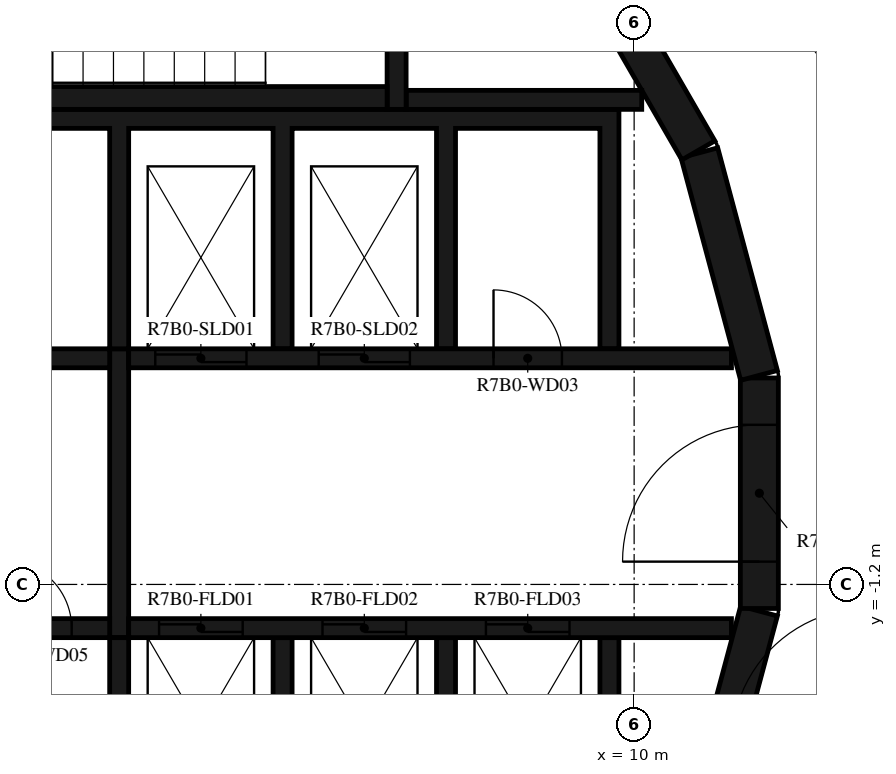
"""IFC4 building model, lengths in metres.
Left out: names, types, materials, properties, quantities, classifications, styles, units other than length and angle.
Written with IfcOpenShell. Run it as: python <this file> out.ifc"""

import sys

from ifc_helpers import new_model, si_unit, direction, frame, frame_2d, origin, place, context, subcontext, project, spatial, polyline, rectangle, outline, extrude, element, fill, save


model = new_model("IFC4")
c1 = context("Model", 3, precision=1e-05, world=origin(), true_north=direction((0.0, 1.0)))
c2 = subcontext(c1, "Body", "Model", "MODEL_VIEW")
j1 = project(units=[si_unit("LENGTHUNIT", "METRE"), si_unit("PLANEANGLEUNIT", "RADIAN")], contexts=[c1])
p1 = place(None, origin())
s1 = spatial("IfcSite", under=j1, at=p1, CompositionType="ELEMENT")
p2 = place(p1, origin())
s2 = spatial("IfcBuilding", under=s1, at=p2, CompositionType="ELEMENT")
p3 = place(p2, frame((0.0, 0.0, 277.4)))
s3 = spatial("IfcBuildingStorey", under=s2, at=p3, CompositionType="ELEMENT", Elevation=277.4)
p4 = place(p3, frame((10.858, -4.479, 0.0), z_axis=(0.0, 0.0, 1.0), x_axis=(0.258734743916, 0.965948410781, 0.0)))
e1 = element("IfcWall", 1, at=p4, inside=s3, PredefinedType="SHEAR", context=c2, shape_type="SweptSolid", body=[
    extrude(rectangle(XDim=3.033, YDim=0.5, at=frame_2d((1.516, 0.0))), origin(), (0.0, 0.0, 1.0), 3.12),
])
p5 = place(p3, frame((11.647, -1.516, 0.0), z_axis=(0.0, 0.0, 1.0), x_axis=(0.0, 1.0, 0.0)))
e2 = element("IfcWall", 2, at=p5, inside=s3, PredefinedType="SHEAR", context=c2, shape_type="SweptSolid", body=[
    extrude(rectangle(XDim=3.033, YDim=0.5, at=frame_2d((1.516, 0.0))), origin(), (0.0, 0.0, 1.0), 3.12),
])
p6 = place(p5, frame((0.616, 0.0, 0.0)))
e3 = element("IfcOpeningElement", 3, at=p6, cuts=e2, PredefinedType="OPENING", context=c2, shape_type="SweptSolid", body=[
    extrude(rectangle(XDim=1.8, YDim=2.1, at=frame_2d((0.9, 1.05))), frame((0.0, 0.26, 0.0), z_axis=(0.0, -1.0, 0.0), x_axis=(1.0, 0.0, 0.0)), (0.0, 0.0, 1.0), 0.52),
])
for number, where, z_axis, x_axis in (
    (4, (11.643, 1.55, 0.0), (0.0, 0.0, 1.0), (-0.259, 0.966, 0.0)),
    (5, (10.845, 4.51, 0.0), (0.0, 0.0, 1.0), (-0.5, 0.866, 0.0)),
):
    element("IfcWall", number, at=place(p3, frame(where, z_axis=z_axis, x_axis=x_axis)), inside=s3, PredefinedType="SHEAR", context=c2, shape_type="SweptSolid", body=[
        extrude(rectangle(XDim=3.033, YDim=0.5, at=frame_2d((1.516, 0.0))), origin(), (0.0, 0.0, 1.0), 3.12),
    ])
p7 = place(p3, frame((0.0, 5.2, 0.0), z_axis=(0.0, 0.0, 1.0), x_axis=(1.0, 0.0, 0.0)))
e6 = element("IfcWall", 6, at=p7, inside=s3, PredefinedType="SHEAR", context=c2, shape_type="SweptSolid", body=[
    extrude(rectangle(XDim=6.75, YDim=0.3, at=frame_2d((3.375, 0.0))), origin(), (0.0, 0.0, 1.0), 3.12),
])
p8 = place(p3, frame((6.875, 5.05, 0.0), z_axis=(0.0, 0.0, 1.0), x_axis=(0.0, 1.0, 0.0)))
e7 = element("IfcWall", 7, at=p8, inside=s3, PredefinedType="SHEAR", context=c2, shape_type="SweptSolid", body=[
    extrude(rectangle(XDim=3.92, YDim=0.25, at=frame_2d((1.96, 0.0))), origin(), (0.0, 0.0, 1.0), 3.12),
])
p9 = place(p8, frame((1.11, 0.0, 0.0)))
e8 = element("IfcOpeningElement", 8, at=p9, cuts=e7, PredefinedType="OPENING", context=c2, shape_type="SweptSolid", body=[
    extrude(rectangle(XDim=1.2, YDim=2.1, at=frame_2d((0.6, 1.05))), frame((0.0, 0.135, 0.0), z_axis=(0.0, -1.0, 0.0), x_axis=(1.0, 0.0, 0.0)), (0.0, 0.0, 1.0), 0.27),
])
p10 = place(p3, frame((7.0, 5.175, 0.0), z_axis=(0.0, 0.0, 1.0), x_axis=(1.0, 0.0, 0.0)))
e9 = element("IfcWall", 9, at=p10, inside=s3, PredefinedType="SHEAR", context=c2, shape_type="SweptSolid", body=[
    extrude(rectangle(XDim=3.1, YDim=0.25, at=frame_2d((1.55, 0.0))), origin(), (0.0, 0.0, 1.0), 3.12),
])
p11 = place(p3, origin())
e10 = element("IfcWall", 10, at=p11, inside=s3, PredefinedType="SHEAR", context=c2, shape_type="SweptSolid", body=[
    extrude(outline(polyline([(-9.8, 1.9), (-9.55, 1.9), (-9.55, 4.8), (-5.5, 4.8), (-5.5, 1.9), (-5.25, 1.9), (-5.25, 4.8), (3.1, 4.8), (3.1, 1.9), (3.35, 1.9), (3.35, 4.8), (5.25, 4.8), (5.25, 1.9), (5.5, 1.9), (5.5, 4.8), (7.4, 4.8), (7.4, 1.9), (7.65, 1.9), (7.65, 4.8), (9.55, 4.8), (9.55, 1.9), (9.8, 1.9), (9.8, 4.8), (9.8, 5.05), (-9.8, 5.05), (-9.8, 4.8), (-9.8, 1.9)])), origin(), (0.0, 0.0, 1.0), 3.12),
])
p12 = place(p3, origin())
e11 = element("IfcWall", 11, at=p12, inside=s3, PredefinedType="SHEAR", context=c2, shape_type="SweptSolid", body=[
    extrude(outline(polyline([(9.8, -5.05), (9.8, -4.8), (9.8, -1.9), (9.55, -1.9), (9.55, -4.8), (7.65, -4.8), (7.65, -1.9), (7.4, -1.9), (7.4, -4.8), (5.5, -4.8), (5.5, -1.9), (5.25, -1.9), (5.25, -4.8), (3.35, -4.8), (3.35, -1.9), (3.1, -1.9), (3.1, -4.8), (1.2, -4.8), (1.2, -1.9), (0.95, -1.9), (0.95, -4.8), (-0.95, -4.8), (-0.95, -1.9), (-1.2, -1.9), (-1.2, -4.8), (-3.1, -4.8), (-3.1, -1.9), (-3.35, -1.9), (-3.35, -4.8), (-5.25, -4.8), (-5.25, -1.9), (-5.5, -1.9), (-5.5, -4.8), (-9.55, -4.8), (-9.55, -1.9), (-9.8, -1.9), (-9.8, -4.8), (-9.8, -5.05), (9.8, -5.05)])), origin(), (0.0, 0.0, 1.0), 3.12),
])
p13 = place(p3, frame((-11.28, 1.775, 0.0), z_axis=(0.0, 0.0, 1.0), x_axis=(1.0, 0.0, 0.0)))
e12 = element("IfcWall", 12, at=p13, inside=s3, PredefinedType="SHEAR", context=c2, shape_type="SweptSolid", body=[
    extrude(rectangle(XDim=14.38, YDim=0.25, at=frame_2d((7.19, 0.0))), origin(), (0.0, 0.0, 1.0), 3.12),
])
p14 = place(p13, frame((3.305, 0.0, 0.0)))
e13 = element("IfcOpeningElement", 13, at=p14, cuts=e12, PredefinedType="OPENING", context=c2, shape_type="SweptSolid", body=[
    extrude(rectangle(XDim=0.9, YDim=2.1, at=frame_2d((0.45, 1.05))), frame((0.0, 0.135, 0.0), z_axis=(0.0, -1.0, 0.0), x_axis=(1.0, 0.0, 0.0)), (0.0, 0.0, 1.0), 0.27),
])
p15 = place(p13, frame((9.755, 0.0, 0.0)))
e14 = element("IfcOpeningElement", 14, at=p15, cuts=e12, PredefinedType="OPENING", context=c2, shape_type="SweptSolid", body=[
    extrude(rectangle(XDim=0.9, YDim=2.1, at=frame_2d((0.45, 1.05))), frame((0.0, 0.135, 0.0), z_axis=(0.0, -1.0, 0.0), x_axis=(1.0, 0.0, 0.0)), (0.0, 0.0, 1.0), 0.27),
])
p16 = place(p3, frame((3.35, 1.775, 0.0), z_axis=(0.0, 0.0, 1.0), x_axis=(1.0, 0.0, 0.0)))
e15 = element("IfcWall", 15, at=p16, inside=s3, PredefinedType="SHEAR", context=c2, shape_type="SweptSolid", body=[
    extrude(rectangle(XDim=7.93, YDim=0.25, at=frame_2d((3.965, 0.0))), origin(), (0.0, 0.0, 1.0), 3.12),
])
p17 = place(p16, frame((0.35, 0.0, 0.0)))
e16 = element("IfcOpeningElement", 16, at=p17, cuts=e15, PredefinedType="OPENING", context=c2, shape_type="SweptSolid", body=[
    extrude(rectangle(XDim=1.2, YDim=2.4, at=frame_2d((0.6, 1.2))), frame((0.0, 0.135, 0.0), z_axis=(0.0, -1.0, 0.0), x_axis=(1.0, 0.0, 0.0)), (0.0, 0.0, 1.0), 0.27),
])
p18 = place(p16, frame((2.5, 0.0, 0.0)))
e17 = element("IfcOpeningElement", 17, at=p18, cuts=e15, PredefinedType="OPENING", context=c2, shape_type="SweptSolid", body=[
    extrude(rectangle(XDim=1.2, YDim=2.4, at=frame_2d((0.6, 1.2))), frame((0.0, 0.135, 0.0), z_axis=(0.0, -1.0, 0.0), x_axis=(1.0, 0.0, 0.0)), (0.0, 0.0, 1.0), 0.27),
])
p19 = place(p16, frame((4.8, 0.0, 0.0)))
e18 = element("IfcOpeningElement", 18, at=p19, cuts=e15, PredefinedType="OPENING", context=c2, shape_type="SweptSolid", body=[
    extrude(rectangle(XDim=0.9, YDim=2.1, at=frame_2d((0.45, 1.05))), frame((0.0, 0.135, 0.0), z_axis=(0.0, -1.0, 0.0), x_axis=(1.0, 0.0, 0.0)), (0.0, 0.0, 1.0), 0.27),
])
p20 = place(p3, frame((-11.28, -1.775, 0.0), z_axis=(0.0, 0.0, 1.0), x_axis=(1.0, 0.0, 0.0)))
e19 = element("IfcWall", 19, at=p20, inside=s3, PredefinedType="SHEAR", context=c2, shape_type="SweptSolid", body=[
    extrude(rectangle(XDim=14.38, YDim=0.25, at=frame_2d((7.19, 0.0))), origin(), (0.0, 0.0, 1.0), 3.12),
])
p21 = place(p20, frame((6.43, 0.0, 0.0)))
e20 = element("IfcOpeningElement", 20, at=p21, cuts=e19, PredefinedType="OPENING", context=c2, shape_type="SweptSolid", body=[
    extrude(rectangle(XDim=1.1, YDim=2.1, at=frame_2d((0.55, 1.05))), frame((0.0, 0.135, 0.0), z_axis=(0.0, -1.0, 0.0), x_axis=(1.0, 0.0, 0.0)), (0.0, 0.0, 1.0), 0.27),
])
p22 = place(p20, frame((8.58, 0.0, 0.0)))
e21 = element("IfcOpeningElement", 21, at=p22, cuts=e19, PredefinedType="OPENING", context=c2, shape_type="SweptSolid", body=[
    extrude(rectangle(XDim=1.1, YDim=2.1, at=frame_2d((0.55, 1.05))), frame((0.0, 0.135, 0.0), z_axis=(0.0, -1.0, 0.0), x_axis=(1.0, 0.0, 0.0)), (0.0, 0.0, 1.0), 0.27),
])
p23 = place(p20, frame((10.73, 0.0, 0.0)))
e22 = element("IfcOpeningElement", 22, at=p23, cuts=e19, PredefinedType="OPENING", context=c2, shape_type="SweptSolid", body=[
    extrude(rectangle(XDim=1.1, YDim=2.1, at=frame_2d((0.55, 1.05))), frame((0.0, 0.135, 0.0), z_axis=(0.0, -1.0, 0.0), x_axis=(1.0, 0.0, 0.0)), (0.0, 0.0, 1.0), 0.27),
])
p24 = place(p20, frame((3.305, 0.0, 0.0)))
e23 = element("IfcOpeningElement", 23, at=p24, cuts=e19, PredefinedType="OPENING", context=c2, shape_type="SweptSolid", body=[
    extrude(rectangle(XDim=0.9, YDim=2.1, at=frame_2d((0.45, 1.05))), frame((0.0, 0.135, 0.0), z_axis=(0.0, -1.0, 0.0), x_axis=(1.0, 0.0, 0.0)), (0.0, 0.0, 1.0), 0.27),
])
p25 = place(p20, frame((12.98, 0.0, 0.0)))
e24 = element("IfcOpeningElement", 24, at=p25, cuts=e19, PredefinedType="OPENING", context=c2, shape_type="SweptSolid", body=[
    extrude(rectangle(XDim=0.9, YDim=2.1, at=frame_2d((0.45, 1.05))), frame((0.0, 0.135, 0.0), z_axis=(0.0, -1.0, 0.0), x_axis=(1.0, 0.0, 0.0)), (0.0, 0.0, 1.0), 0.27),
])
p26 = place(p3, frame((3.35, -1.775, 0.0), z_axis=(0.0, 0.0, 1.0), x_axis=(1.0, 0.0, 0.0)))
e25 = element("IfcWall", 25, at=p26, inside=s3, PredefinedType="SHEAR", context=c2, shape_type="SweptSolid", body=[
    extrude(rectangle(XDim=7.93, YDim=0.25, at=frame_2d((3.965, 0.0))), origin(), (0.0, 0.0, 1.0), 3.12),
])
p27 = place(p26, frame((0.4, 0.0, 0.0)))
e26 = element("IfcOpeningElement", 26, at=p27, cuts=e25, PredefinedType="OPENING", context=c2, shape_type="SweptSolid", body=[
    extrude(rectangle(XDim=1.1, YDim=2.4, at=frame_2d((0.55, 1.2))), frame((0.0, 0.135, 0.0), z_axis=(0.0, -1.0, 0.0), x_axis=(1.0, 0.0, 0.0)), (0.0, 0.0, 1.0), 0.27),
])
p28 = place(p26, frame((2.55, 0.0, 0.0)))
e27 = element("IfcOpeningElement", 27, at=p28, cuts=e25, PredefinedType="OPENING", context=c2, shape_type="SweptSolid", body=[
    extrude(rectangle(XDim=1.1, YDim=2.4, at=frame_2d((0.55, 1.2))), frame((0.0, 0.135, 0.0), z_axis=(0.0, -1.0, 0.0), x_axis=(1.0, 0.0, 0.0)), (0.0, 0.0, 1.0), 0.27),
])
p29 = place(p26, frame((4.7, 0.0, 0.0)))
e28 = element("IfcOpeningElement", 28, at=p29, cuts=e25, PredefinedType="OPENING", context=c2, shape_type="SweptSolid", body=[
    extrude(rectangle(XDim=1.1, YDim=2.4, at=frame_2d((0.55, 1.2))), frame((0.0, 0.135, 0.0), z_axis=(0.0, -1.0, 0.0), x_axis=(1.0, 0.0, 0.0)), (0.0, 0.0, 1.0), 0.27),
])
p30 = place(p3, frame((3.225, -1.9, 0.0), z_axis=(0.0, 0.0, 1.0), x_axis=(0.0, 1.0, 0.0)))
e29 = element("IfcWall", 29, at=p30, inside=s3, PredefinedType="SHEAR", context=c2, shape_type="SweptSolid", body=[
    extrude(rectangle(XDim=3.8, YDim=0.25, at=frame_2d((1.9, 0.0))), origin(), (0.0, 0.0, 1.0), 3.12),
])
p31 = place(p3, frame((11.223, -8.154, 0.0), z_axis=(0.0, 0.0, 1.0), x_axis=(0.358341090983, 0.93359073609, 0.0)))
e30 = element("IfcWall", 30, at=p31, inside=s3, PredefinedType="STANDARD", context=c2, shape_type="SweptSolid", body=[
    extrude(rectangle(XDim=7.181, YDim=0.2, at=frame_2d((3.59, 0.0))), origin(), (0.0, 0.0, 1.0), 3.12),
])
p32 = place(p31, frame((5.185, 0.0, 0.0)))
e31 = element("IfcOpeningElement", 31, at=p32, cuts=e30, PredefinedType="OPENING", context=c2, shape_type="SweptSolid", body=[
    extrude(rectangle(XDim=1.8, YDim=2.1, at=frame_2d((0.9, 1.05))), frame((0.0, 0.11, 0.0), z_axis=(0.0, -1.0, 0.0), x_axis=(1.0, 0.0, 0.0)), (0.0, 0.0, 1.0), 0.22),
])
p33 = place(p3, frame((12.673, 5.643, 0.0), z_axis=(0.0, 0.0, 1.0), x_axis=(-0.629302871585, 0.777160148113, 0.0)))
e32 = element("IfcWall", 32, at=p33, inside=s3, PredefinedType="STANDARD", context=c2, shape_type="SweptSolid", body=[
    extrude(rectangle(XDim=7.181, YDim=0.2, at=frame_2d((3.59, 0.0))), origin(), (0.0, 0.0, 1.0), 3.12),
])
p34 = place(p33, frame((4.1, 0.0, 0.0)))
e33 = element("IfcOpeningElement", 33, at=p34, cuts=e32, PredefinedType="OPENING", context=c2, shape_type="SweptSolid", body=[
    extrude(rectangle(XDim=1.0, YDim=2.1, at=frame_2d((0.5, 1.05))), frame((0.0, 0.11, 0.0), z_axis=(0.0, -1.0, 0.0), x_axis=(1.0, 0.0, 0.0)), (0.0, 0.0, 1.0), 0.22),
])
p35 = place(p6, origin())
e34 = element("IfcDoor", 34, at=p35, inside=s3, OperationType="DOUBLE_DOOR_SINGLE_SWING", PredefinedType="DOOR", context=c2, shape_type="SweptSolid", body=[
    extrude(rectangle(XDim=1.8, YDim=2.1, at=frame_2d((0.9, 1.05))), frame((0.0, 0.025, 0.0), z_axis=(0.0, -1.0, 0.0), x_axis=(1.0, 0.0, 0.0)), (0.0, 0.0, 1.0), 0.05),
])
fill(e3, e34)
p36 = place(p17, origin())
e35 = element("IfcDoor", 35, at=p36, inside=s3, OperationType="DOUBLE_DOOR_SLIDING", PredefinedType="DOOR", context=c2, shape_type="SweptSolid", body=[
    extrude(rectangle(XDim=1.2, YDim=2.4, at=frame_2d((0.6, 1.2))), frame((0.0, 0.025, 0.0), z_axis=(0.0, -1.0, 0.0), x_axis=(1.0, 0.0, 0.0)), (0.0, 0.0, 1.0), 0.05),
])
fill(e16, e35)
p37 = place(p18, origin())
e36 = element("IfcDoor", 36, at=p37, inside=s3, OperationType="DOUBLE_DOOR_SLIDING", PredefinedType="DOOR", context=c2, shape_type="SweptSolid", body=[
    extrude(rectangle(XDim=1.2, YDim=2.4, at=frame_2d((0.6, 1.2))), frame((0.0, 0.025, 0.0), z_axis=(0.0, -1.0, 0.0), x_axis=(1.0, 0.0, 0.0)), (0.0, 0.0, 1.0), 0.05),
])
fill(e17, e36)
p38 = place(p27, origin())
e37 = element("IfcDoor", 37, at=p38, inside=s3, OperationType="DOUBLE_DOOR_SLIDING", PredefinedType="DOOR", context=c2, shape_type="SweptSolid", body=[
    extrude(rectangle(XDim=1.1, YDim=2.4, at=frame_2d((0.55, 1.2))), frame((0.0, 0.025, 0.0), z_axis=(0.0, -1.0, 0.0), x_axis=(1.0, 0.0, 0.0)), (0.0, 0.0, 1.0), 0.05),
])
fill(e26, e37)
p39 = place(p28, origin())
e38 = element("IfcDoor", 38, at=p39, inside=s3, OperationType="DOUBLE_DOOR_SLIDING", PredefinedType="DOOR", context=c2, shape_type="SweptSolid", body=[
    extrude(rectangle(XDim=1.1, YDim=2.4, at=frame_2d((0.55, 1.2))), frame((0.0, 0.025, 0.0), z_axis=(0.0, -1.0, 0.0), x_axis=(1.0, 0.0, 0.0)), (0.0, 0.0, 1.0), 0.05),
])
fill(e27, e38)
p40 = place(p29, origin())
e39 = element("IfcDoor", 39, at=p40, inside=s3, OperationType="DOUBLE_DOOR_SLIDING", PredefinedType="DOOR", context=c2, shape_type="SweptSolid", body=[
    extrude(rectangle(XDim=1.1, YDim=2.4, at=frame_2d((0.55, 1.2))), frame((0.0, 0.025, 0.0), z_axis=(0.0, -1.0, 0.0), x_axis=(1.0, 0.0, 0.0)), (0.0, 0.0, 1.0), 0.05),
])
fill(e28, e39)
p41 = place(p19, origin())
e40 = element("IfcDoor", 40, at=p41, inside=s3, OperationType="SINGLE_SWING_LEFT", PredefinedType="DOOR", context=c2, shape_type="SweptSolid", body=[
    extrude(rectangle(XDim=0.9, YDim=2.1, at=frame_2d((0.45, 1.05))), frame((0.0, 0.025, 0.0), z_axis=(0.0, -1.0, 0.0), x_axis=(1.0, 0.0, 0.0)), (0.0, 0.0, 1.0), 0.05),
])
fill(e18, e40)
p42 = place(p25, origin())
e41 = element("IfcDoor", 41, at=p42, inside=s3, OperationType="SINGLE_SWING_LEFT", PredefinedType="DOOR", context=c2, shape_type="SweptSolid", body=[
    extrude(rectangle(XDim=0.9, YDim=2.1, at=frame_2d((0.45, 1.05))), frame((0.0, 0.025, 0.0), z_axis=(0.0, -1.0, 0.0), x_axis=(1.0, 0.0, 0.0)), (0.0, 0.0, 1.0), 0.05),
])
fill(e24, e41)
save(model, sys.argv[1])
